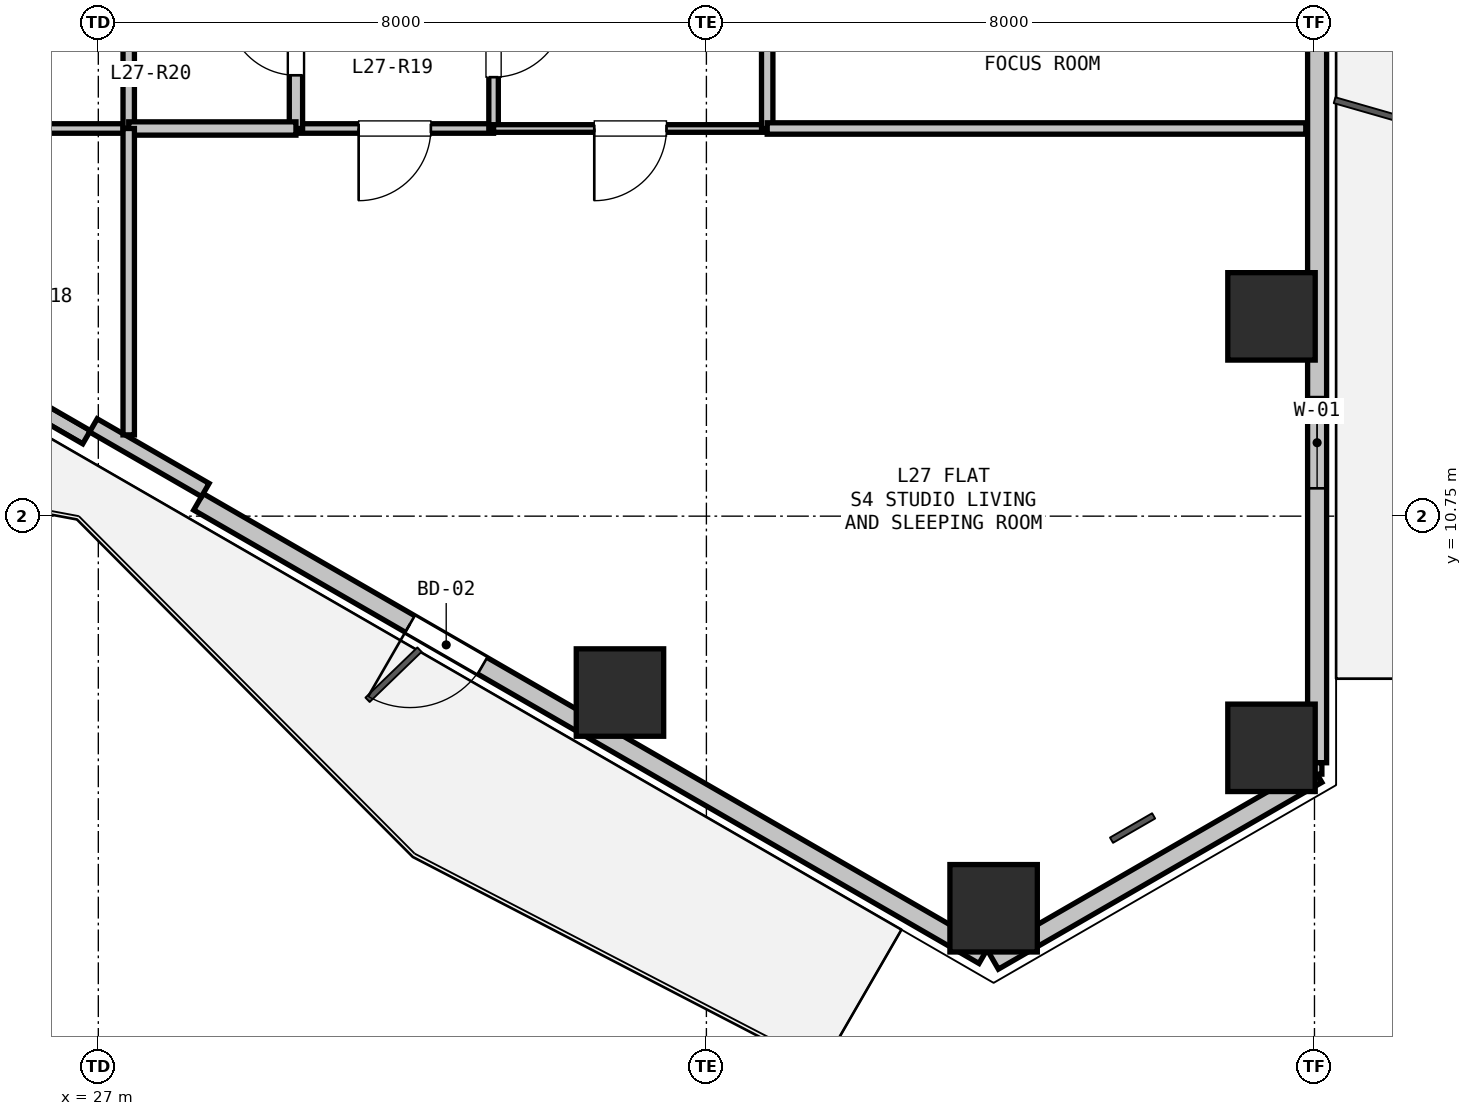
"""IFC4 building model, lengths in metres.
Left out: names, types, materials, properties, quantities, classifications, styles, units other than length and angle.
Written with IfcOpenShell. Run it as: python <this file> out.ifc"""

import sys

from ifc_helpers import new_model, si_unit, direction, frame, frame_2d, origin, origin_2d, place, context, subcontext, project, spatial, rectangle, hollow_rectangle, extrude, element, fill, save


model = new_model("IFC4")
c1 = context("Model", 3, precision=1e-05, world=origin(), true_north=direction((0.0, 1.0)))
c2 = subcontext(c1, "Body", "Model", "MODEL_VIEW")
j1 = project(units=[si_unit("LENGTHUNIT", "METRE"), si_unit("PLANEANGLEUNIT", "RADIAN")], contexts=[c1])
p1 = place(None, origin())
s1 = spatial("IfcSite", under=j1, at=p1, CompositionType="ELEMENT")
p2 = place(p1, origin())
s2 = spatial("IfcBuilding", under=s1, at=p2, CompositionType="ELEMENT")
p3 = place(p2, frame((0.0, 0.0, 99.9)))
s3 = spatial("IfcBuildingStorey", under=s2, at=p3, CompositionType="ELEMENT", Elevation=99.9)
for number, where, z_axis, x_axis in (
    (1, (42.435, 13.378, 0.0), (0.0, 0.0, 1.0), (1.0, 0.0, 0.0)),
    (2, (42.435, 7.702, 0.0), (0.0, 0.0, 1.0), (1.0, 0.0, 0.0)),
    (3, (38.779, 5.591, 0.0), (0.0, 0.0, 1.0), (1.0, 0.0, 0.0)),
    (4, (33.863, 8.429, 0.0), (0.0, 0.0, 1.0), (1.0, 0.0, 0.0)),
):
    element("IfcColumn", number, at=place(p3, frame(where, z_axis=z_axis, x_axis=x_axis)), inside=s3, PredefinedType="COLUMN", context=c2, shape_type="SweptSolid", body=[
        extrude(hollow_rectangle(XDim=1.15, YDim=1.15, WallThickness=0.032, at=origin_2d()), origin(), (0.0, 0.0, 1.0), 3.3),
    ])
p4 = place(p3, frame((43.035, 7.356, 0.0), z_axis=(0.0, 0.0, 1.0), x_axis=(-0.866011848704, -0.500023477353, 0.0)))
e5 = element("IfcWall", 5, at=p4, inside=s3, PredefinedType="SOLIDWALL", context=c2, shape_type="SweptSolid", body=[
    extrude(rectangle(XDim=4.914, YDim=0.25, at=frame_2d((2.457, 0.0))), origin(), (0.0, 0.0, 1.0), 2.67),
])
p5 = place(p3, frame((43.035, 19.435, 0.0), z_axis=(0.0, 0.0, 1.0), x_axis=(0.0, -1.0, 0.0)))
e6 = element("IfcWall", 6, at=p5, inside=s3, PredefinedType="SOLIDWALL", context=c2, shape_type="SweptSolid", body=[
    extrude(rectangle(XDim=11.93, YDim=0.25, at=frame_2d((5.965, 0.0))), origin(), (0.0, 0.0, 1.0), 2.67),
])
p6 = place(p5, frame((7.119, 0.0, 0.9)))
e7 = element("IfcOpeningElement", 7, at=p6, cuts=e6, PredefinedType="OPENING", context=c2, shape_type="SweptSolid", body=[
    extrude(rectangle(XDim=1.2, YDim=1.4, at=frame_2d((0.6, 0.7))), frame((0.0, 0.135, 0.0), z_axis=(0.0, -1.0, 0.0), x_axis=(1.0, 0.0, 0.0)), (0.0, 0.0, 1.0), 0.27),
])
p7 = place(p3, frame((38.649, 4.973, 0.0), z_axis=(0.0, 0.0, 1.0), x_axis=(-0.866023023012, 0.500004123596, 0.0)))
e8 = element("IfcWall", 8, at=p7, inside=s3, PredefinedType="SOLIDWALL", context=c2, shape_type="SweptSolid", body=[
    extrude(rectangle(XDim=11.93, YDim=0.25, at=frame_2d((5.965, 0.0))), origin(), (0.0, 0.0, 1.0), 2.67),
])
p8 = place(p7, frame((7.616, 0.0, 0.0)))
e9 = element("IfcOpeningElement", 9, at=p8, cuts=e8, PredefinedType="OPENING", context=c2, shape_type="SweptSolid", body=[
    extrude(rectangle(XDim=1.1, YDim=2.1, at=frame_2d((0.55, 1.05))), frame((0.0, 0.135, 0.0), z_axis=(0.0, -1.0, 0.0), x_axis=(1.0, 0.0, 0.0)), (0.0, 0.0, 1.0), 0.27),
])
p9 = place(p3, frame((26.845, 11.788, 0.0), z_axis=(0.0, 0.0, 1.0), x_axis=(-0.866027010039, 0.499997217876, 0.0)))
e10 = element("IfcWall", 10, at=p9, inside=s3, PredefinedType="PARAPET", context=c2, shape_type="SweptSolid", body=[
    extrude(rectangle(XDim=11.229, YDim=0.2, at=frame_2d((5.615, 0.0))), origin(), (0.0, 0.0, 1.0), 0.2),
])
p10 = place(p3, frame((28.407, 11.094, 0.0), z_axis=(0.0, 0.0, 1.0), x_axis=(-0.86605165483, 0.499954529098, 0.0)))
e11 = element("IfcWall", 11, at=p10, inside=s3, PredefinedType="PARAPET", context=c2, shape_type="SweptSolid", body=[
    extrude(rectangle(XDim=1.7, YDim=0.2, at=frame_2d((0.85, 0.0))), origin(), (0.0, 0.0, 1.0), 2.67),
])
p11 = place(p3, frame((32.2, 15.85, 0.0), z_axis=(0.0, 0.0, 1.0), x_axis=(-1.0, 0.0, 0.0)))
e12 = element("IfcWall", 12, at=p11, inside=s3, PredefinedType="PARTITIONING", context=c2, shape_type="SweptSolid", body=[
    extrude(rectangle(XDim=2.6, YDim=0.125, at=frame_2d((1.3, 0.0))), origin(), (0.0, 0.0, 1.0), 3.05),
])
p12 = place(p11, frame((0.825, 0.0, 0.0)))
e13 = element("IfcOpeningElement", 13, at=p12, cuts=e12, PredefinedType="OPENING", context=c2, shape_type="SweptSolid", body=[
    extrude(rectangle(XDim=0.95, YDim=2.1, at=frame_2d((0.475, 1.05))), frame((0.0, 0.073, 0.0), z_axis=(0.0, -1.0, 0.0), x_axis=(1.0, 0.0, 0.0)), (0.0, 0.0, 1.0), 0.145),
])
p13 = place(p3, frame((29.6, 15.85, 0.0), z_axis=(0.0, 0.0, 1.0), x_axis=(0.0, 1.0, 0.0)))
e14 = element("IfcWall", 14, at=p13, inside=s3, PredefinedType="PLUMBINGWALL", context=c2, shape_type="SweptSolid", body=[
    extrude(rectangle(XDim=2.3, YDim=0.175, at=frame_2d((1.15, 0.0))), origin(), (0.0, 0.0, 1.0), 3.05),
])
p14 = place(p13, frame((0.7, 0.0, 0.0)))
e15 = element("IfcOpeningElement", 15, at=p14, cuts=e14, PredefinedType="OPENING", context=c2, shape_type="SweptSolid", body=[
    extrude(rectangle(XDim=0.9, YDim=2.1, at=frame_2d((0.45, 1.05))), frame((0.0, 0.097, 0.0), z_axis=(0.0, -1.0, 0.0), x_axis=(1.0, 0.0, 0.0)), (0.0, 0.0, 1.0), 0.195),
])
p15 = place(p3, frame((32.2, 18.15, 0.0), z_axis=(0.0, 0.0, 1.0), x_axis=(0.0, -1.0, 0.0)))
e16 = element("IfcWall", 16, at=p15, inside=s3, PredefinedType="PARTITIONING", context=c2, shape_type="SweptSolid", body=[
    extrude(rectangle(XDim=2.3, YDim=0.125, at=frame_2d((1.15, 0.0))), origin(), (0.0, 0.0, 1.0), 3.05),
])
p16 = place(p15, frame((0.675, 0.0, 0.0)))
e17 = element("IfcOpeningElement", 17, at=p16, cuts=e16, PredefinedType="OPENING", context=c2, shape_type="SweptSolid", body=[
    extrude(rectangle(XDim=0.95, YDim=2.1, at=frame_2d((0.475, 1.05))), frame((0.0, 0.073, 0.0), z_axis=(0.0, -1.0, 0.0), x_axis=(1.0, 0.0, 0.0)), (0.0, 0.0, 1.0), 0.145),
])
p17 = place(p3, frame((27.4, 15.85, 0.0), z_axis=(0.0, 0.0, 1.0), x_axis=(-1.0, 0.0, 0.0)))
e18 = element("IfcWall", 18, at=p17, inside=s3, PredefinedType="PARTITIONING", context=c2, shape_type="SweptSolid", body=[
    extrude(rectangle(XDim=3.2, YDim=0.125, at=frame_2d((1.6, 0.0))), origin(), (0.0, 0.0, 1.0), 2.423),
])
p18 = place(p17, frame((1.125, 0.0, 0.0)))
e19 = element("IfcOpeningElement", 19, at=p18, cuts=e18, PredefinedType="OPENING", context=c2, shape_type="SweptSolid", body=[
    extrude(rectangle(XDim=0.95, YDim=2.1, at=frame_2d((0.475, 1.05))), frame((0.0, 0.073, 0.0), z_axis=(0.0, -1.0, 0.0), x_axis=(1.0, 0.0, 0.0)), (0.0, 0.0, 1.0), 0.145),
])
p19 = place(p3, frame((27.4, 18.15, 0.0), z_axis=(0.0, 0.0, 1.0), x_axis=(0.0, -1.0, 0.0)))
e20 = element("IfcWall", 20, at=p19, inside=s3, PredefinedType="PARTITIONING", context=c2, shape_type="SweptSolid", body=[
    extrude(rectangle(XDim=2.3, YDim=0.15, at=frame_2d((1.15, 0.0))), origin(), (0.0, 0.0, 1.0), 3.05),
])
p20 = place(p3, frame((29.6, 15.85, 0.0), z_axis=(0.0, 0.0, 1.0), x_axis=(-1.0, 0.0, 0.0)))
e21 = element("IfcWall", 21, at=p20, inside=s3, PredefinedType="PLUMBINGWALL", context=c2, shape_type="SweptSolid", body=[
    extrude(rectangle(XDim=2.2, YDim=0.175, at=frame_2d((1.1, 0.0))), origin(), (0.0, 0.0, 1.0), 3.05),
])
p21 = place(p3, frame((35.8, 15.85, 0.0), z_axis=(0.0, 0.0, 1.0), x_axis=(-1.0, 0.0, 0.0)))
e22 = element("IfcWall", 22, at=p21, inside=s3, PredefinedType="PARTITIONING", context=c2, shape_type="SweptSolid", body=[
    extrude(rectangle(XDim=3.6, YDim=0.1, at=frame_2d((1.8, 0.0))), origin(), (0.0, 0.0, 1.0), 3.05),
])
p22 = place(p21, frame((1.325, 0.0, 0.0)))
e23 = element("IfcOpeningElement", 23, at=p22, cuts=e22, PredefinedType="OPENING", context=c2, shape_type="SweptSolid", body=[
    extrude(rectangle(XDim=0.95, YDim=2.1, at=frame_2d((0.475, 1.05))), frame((0.0, 0.06, 0.0), z_axis=(0.0, -1.0, 0.0), x_axis=(1.0, 0.0, 0.0)), (0.0, 0.0, 1.0), 0.12),
])
p23 = place(p3, frame((35.8, 18.15, 0.0), z_axis=(0.0, 0.0, 1.0), x_axis=(0.0, -1.0, 0.0)))
e24 = element("IfcWall", 24, at=p23, inside=s3, PredefinedType="PARTITIONING", context=c2, shape_type="SweptSolid", body=[
    extrude(rectangle(XDim=2.3, YDim=0.15, at=frame_2d((1.15, 0.0))), origin(), (0.0, 0.0, 1.0), 3.05),
])
p24 = place(p3, frame((42.885, 15.85, 0.0), z_axis=(0.0, 0.0, 1.0), x_axis=(-1.0, 0.0, 0.0)))
e25 = element("IfcWall", 25, at=p24, inside=s3, PredefinedType="PARTITIONING", context=c2, shape_type="SweptSolid", body=[
    extrude(rectangle(XDim=7.085, YDim=0.15, at=frame_2d((3.543, 0.0))), origin(), (0.0, 0.0, 1.0), 2.365),
])
p25 = place(p3, frame((27.4, 15.85, 0.0), z_axis=(0.0, 0.0, 1.0), x_axis=(0.0, -1.0, 0.0)))
e26 = element("IfcWall", 26, at=p25, inside=s3, PredefinedType="PARTITIONING", context=c2, shape_type="SweptSolid", body=[
    extrude(rectangle(XDim=4.031, YDim=0.15, at=frame_2d((2.016, 0.0))), origin(), (0.0, 0.0, 1.0), 2.365),
])
p26 = place(p3, frame((43.035, 7.506, 0.0), z_axis=(0.0, 0.0, 1.0), x_axis=(0.0, -1.0, 0.0)))
e27 = element("IfcWall", 27, at=p26, inside=s3, PredefinedType="PARTITIONING", context=c2, shape_type="SweptSolid", body=[
    extrude(rectangle(XDim=0.15, YDim=0.125, at=frame_2d((0.075, 0.0))), origin(), (0.0, 0.0, 1.0), 3.05),
])
p27 = place(p6, origin())
e28 = element("IfcWindow", 28, at=p27, inside=s3, PartitioningType="SINGLE_PANEL", PredefinedType="WINDOW", context=c2, shape_type="SweptSolid", body=[
    extrude(rectangle(XDim=1.2, YDim=1.4, at=frame_2d((0.6, 0.7))), frame((0.0, 0.03, 0.0), z_axis=(0.0, -1.0, 0.0), x_axis=(1.0, 0.0, 0.0)), (0.0, 0.0, 1.0), 0.06),
])
fill(e7, e28)
p28 = place(p8, origin())
e29 = element("IfcDoor", 29, at=p28, inside=s3, OperationType="SINGLE_SWING_RIGHT", PredefinedType="DOOR", context=c2, shape_type="SweptSolid", body=[
    extrude(rectangle(XDim=1.1, YDim=2.1, at=frame_2d((0.55, 1.05))), frame((0.0, 0.025, 0.0), z_axis=(0.0, -1.0, 0.0), x_axis=(1.0, 0.0, 0.0)), (0.0, 0.0, 1.0), 0.05),
])
fill(e9, e29)
p29 = place(p14, origin())
e30 = element("IfcDoor", 30, at=p29, inside=s3, OperationType="SINGLE_SWING_RIGHT", PredefinedType="DOOR", context=c2, shape_type="SweptSolid", body=[
    extrude(rectangle(XDim=0.9, YDim=2.1, at=frame_2d((0.45, 1.05))), frame((0.0, 0.025, 0.0), z_axis=(0.0, -1.0, 0.0), x_axis=(1.0, 0.0, 0.0)), (0.0, 0.0, 1.0), 0.05),
])
fill(e15, e30)
p30 = place(p16, origin())
e31 = element("IfcDoor", 31, at=p30, inside=s3, OperationType="SINGLE_SWING_LEFT", PredefinedType="DOOR", context=c2, shape_type="SweptSolid", body=[
    extrude(rectangle(XDim=0.95, YDim=2.1, at=frame_2d((0.475, 1.05))), frame((0.0, 0.025, 0.0), z_axis=(0.0, -1.0, 0.0), x_axis=(1.0, 0.0, 0.0)), (0.0, 0.0, 1.0), 0.05),
])
fill(e17, e31)
p31 = place(p12, origin())
e32 = element("IfcDoor", 32, at=p31, inside=s3, OperationType="SINGLE_SWING_RIGHT", PredefinedType="DOOR", context=c2, shape_type="SweptSolid", body=[
    extrude(rectangle(XDim=0.95, YDim=2.1, at=frame_2d((0.475, 1.05))), frame((0.0, 0.025, 0.0), z_axis=(0.0, -1.0, 0.0), x_axis=(1.0, 0.0, 0.0)), (0.0, 0.0, 1.0), 0.05),
])
fill(e13, e32)
p32 = place(p22, origin())
e33 = element("IfcDoor", 33, at=p32, inside=s3, OperationType="SINGLE_SWING_RIGHT", PredefinedType="DOOR", context=c2, shape_type="SweptSolid", body=[
    extrude(rectangle(XDim=0.95, YDim=2.1, at=frame_2d((0.475, 1.05))), frame((0.0, 0.025, 0.0), z_axis=(0.0, -1.0, 0.0), x_axis=(1.0, 0.0, 0.0)), (0.0, 0.0, 1.0), 0.05),
])
fill(e23, e33)
save(model, sys.argv[1])
